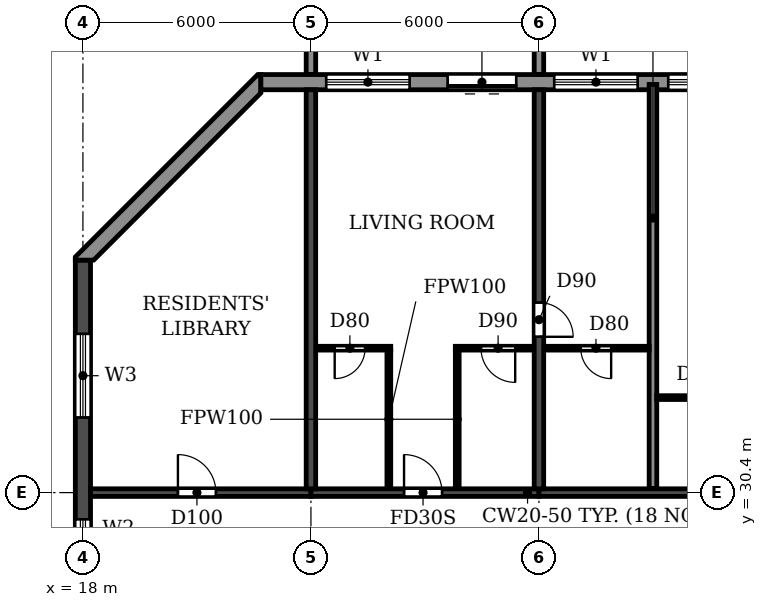
"""IFC4 building model, lengths in metres.
Left out: names, types, materials, properties, quantities, classifications, styles, units other than length and angle.
Written with IfcOpenShell. Run it as: python <this file> out.ifc"""

import sys

from ifc_helpers import new_model, si_unit, direction, frame, frame_2d, origin, place, context, subcontext, project, spatial, polyline, rectangle, outline, extrude, source, transform, mapped, element, fill, save


model = new_model("IFC4")
c1 = context("Model", 3, precision=1e-05, world=origin(), true_north=direction((0.0, 1.0)))
c2 = subcontext(c1, "Body", "Model", "MODEL_VIEW")
j1 = project(units=[si_unit("LENGTHUNIT", "METRE"), si_unit("PLANEANGLEUNIT", "RADIAN")], contexts=[c1])
p1 = place(None, origin())
s1 = spatial("IfcSite", under=j1, at=p1, CompositionType="ELEMENT")
p2 = place(p1, origin())
s2 = spatial("IfcBuilding", under=s1, at=p2, CompositionType="ELEMENT")
p3 = place(p2, frame((0.0, 0.0, 175.2)))
s3 = spatial("IfcBuildingStorey", under=s2, at=p3, CompositionType="ELEMENT", Elevation=175.2)
p4 = place(p3, frame((24.0, 30.5, 0.0), z_axis=(0.0, 0.0, 1.0), x_axis=(0.0, 1.0, 0.0)))
e1 = element("IfcWall", 1, at=p4, inside=s3, PredefinedType="SHEAR", context=c2, shape_type="SweptSolid", body=[
    extrude(rectangle(XDim=10.5, YDim=0.25, at=frame_2d((5.25, 0.0))), origin(), (0.0, 0.0, 1.0), 3.08),
])
p5 = place(p3, frame((30.0, 30.5, 0.0), z_axis=(0.0, 0.0, 1.0), x_axis=(0.0, 1.0, 0.0)))
e2 = element("IfcWall", 2, at=p5, inside=s3, PredefinedType="SHEAR", context=c2, shape_type="SweptSolid", body=[
    extrude(rectangle(XDim=10.5, YDim=0.25, at=frame_2d((5.25, 0.0))), origin(), (0.0, 0.0, 1.0), 3.08),
])
p6 = place(p5, frame((4.0, 0.0, 0.0)))
e3 = element("IfcOpeningElement", 3, at=p6, cuts=e2, PredefinedType="OPENING", context=c2, shape_type="SweptSolid", body=[
    extrude(rectangle(XDim=0.9, YDim=2.1, at=frame_2d((0.45, 1.05))), frame((0.0, 0.135, 0.0), z_axis=(0.0, -1.0, 0.0), x_axis=(1.0, 0.0, 0.0)), (0.0, 0.0, 1.0), 0.27),
])
p7 = place(p3, frame((18.0, 4.683, 0.0), z_axis=(0.0, 0.0, 1.0), x_axis=(0.0, 1.0, 0.0)))
e4 = element("IfcWall", 4, at=p7, inside=s3, PredefinedType="SHEAR", context=c2, shape_type="SweptSolid", body=[
    extrude(rectangle(XDim=31.834, YDim=0.4, at=frame_2d((15.917, 0.0))), origin(), (0.0, 0.0, 1.0), 3.08),
])
p8 = place(p7, frame((23.817, 0.0, 0.9)))
e5 = element("IfcOpeningElement", 5, at=p8, cuts=e4, PredefinedType="OPENING", context=c2, shape_type="SweptSolid", body=[
    extrude(rectangle(XDim=1.2, YDim=1.5, at=frame_2d((0.6, 0.75))), frame((0.0, 0.21, 0.0), z_axis=(0.0, -1.0, 0.0), x_axis=(1.0, 0.0, 0.0)), (0.0, 0.0, 1.0), 0.42),
])
p9 = place(p7, frame((8.017, 0.0, 0.9)))
e6 = element("IfcOpeningElement", 6, at=p9, cuts=e4, PredefinedType="OPENING", context=c2, shape_type="SweptSolid", body=[
    extrude(rectangle(XDim=1.2, YDim=1.5, at=frame_2d((0.6, 0.75))), frame((0.0, 0.21, 0.0), z_axis=(0.0, -1.0, 0.0), x_axis=(1.0, 0.0, 0.0)), (0.0, 0.0, 1.0), 0.42),
])
p10 = place(p7, frame((27.694, 0.0, 0.6)))
e7 = element("IfcOpeningElement", 7, at=p10, cuts=e4, PredefinedType="OPENING", context=c2, shape_type="SweptSolid", body=[
    extrude(rectangle(XDim=2.2, YDim=1.8, at=frame_2d((1.1, 0.9))), frame((0.0, 0.21, 0.0), z_axis=(0.0, -1.0, 0.0), x_axis=(1.0, 0.0, 0.0)), (0.0, 0.0, 1.0), 0.42),
])
p11 = place(p7, frame((2.541, 0.0, 0.6)))
e8 = element("IfcOpeningElement", 8, at=p11, cuts=e4, PredefinedType="OPENING", context=c2, shape_type="SweptSolid", body=[
    extrude(rectangle(XDim=2.2, YDim=1.8, at=frame_2d((1.1, 0.9))), frame((0.0, 0.21, 0.0), z_axis=(0.0, -1.0, 0.0), x_axis=(1.0, 0.0, 0.0)), (0.0, 0.0, 1.0), 0.42),
])
p12 = place(p7, frame((15.917, 0.0, 0.9)))
e9 = element("IfcOpeningElement", 9, at=p12, cuts=e4, PredefinedType="OPENING", context=c2, shape_type="SweptSolid", body=[
    extrude(rectangle(XDim=1.2, YDim=1.5, at=frame_2d((0.6, 0.75))), frame((0.0, 0.21, 0.0), z_axis=(0.0, -1.0, 0.0), x_axis=(1.0, 0.0, 0.0)), (0.0, 0.0, 1.0), 0.42),
])
p13 = place(p3, frame((18.2, 30.4, 0.0), z_axis=(0.0, 0.0, 1.0), x_axis=(1.0, 0.0, 0.0)))
e10 = element("IfcWall", 10, at=p13, inside=s3, PredefinedType="SHEAR", context=c2, shape_type="SweptSolid", body=[
    extrude(rectangle(XDim=5.8, YDim=0.2, at=frame_2d((2.9, 0.0))), origin(), (0.0, 0.0, 1.0), 2.48),
])
p14 = place(p13, frame((2.3, 0.0, 0.0)))
e11 = element("IfcOpeningElement", 11, at=p14, cuts=e10, PredefinedType="OPENING", context=c2, shape_type="SweptSolid", body=[
    extrude(rectangle(XDim=1.0, YDim=2.1, at=frame_2d((0.5, 1.05))), frame((0.0, 0.11, 0.0), z_axis=(0.0, -1.0, 0.0), x_axis=(1.0, 0.0, 0.0)), (0.0, 0.0, 1.0), 0.22),
])
p15 = place(p3, frame((24.0, 30.4, 0.0), z_axis=(0.0, 0.0, 1.0), x_axis=(1.0, 0.0, 0.0)))
e12 = element("IfcWall", 12, at=p15, inside=s3, PredefinedType="SHEAR", context=c2, shape_type="SweptSolid", body=[
    extrude(rectangle(XDim=6.0, YDim=0.2, at=frame_2d((3.0, 0.0))), origin(), (0.0, 0.0, 1.0), 2.48),
])
p16 = place(p15, frame((2.45, 0.0, 0.0)))
e13 = element("IfcOpeningElement", 13, at=p16, cuts=e12, PredefinedType="OPENING", context=c2, shape_type="SweptSolid", body=[
    extrude(rectangle(XDim=1.0, YDim=2.1, at=frame_2d((0.5, 1.05))), frame((0.0, 0.11, 0.0), z_axis=(0.0, -1.0, 0.0), x_axis=(1.0, 0.0, 0.0)), (0.0, 0.0, 1.0), 0.22),
])
p17 = place(p3, frame((30.0, 30.4, 0.0), z_axis=(0.0, 0.0, 1.0), x_axis=(1.0, 0.0, 0.0)))
e14 = element("IfcWall", 14, at=p17, inside=s3, PredefinedType="SHEAR", context=c2, shape_type="SweptSolid", body=[
    extrude(rectangle(XDim=6.0, YDim=0.2, at=frame_2d((3.0, 0.0))), origin(), (0.0, 0.0, 1.0), 2.48),
])
p18 = place(p3, frame((79.317, 41.2, 0.0), z_axis=(0.0, 0.0, 1.0), x_axis=(-1.0, 0.0, 0.0)))
e15 = element("IfcWall", 15, at=p18, inside=s3, PredefinedType="STANDARD", context=c2, shape_type="SweptSolid", body=[
    extrude(rectangle(XDim=56.634, YDim=0.4, at=frame_2d((28.317, 0.0))), origin(), (0.0, 0.0, 1.0), 3.08),
])
p19 = place(p18, frame((52.717, 0.0, 0.9)))
e16 = element("IfcOpeningElement", 16, at=p19, cuts=e15, PredefinedType="OPENING", context=c2, shape_type="SweptSolid", body=[
    extrude(rectangle(XDim=2.2, YDim=1.5, at=frame_2d((1.1, 0.75))), frame((0.0, 0.21, 0.0), z_axis=(0.0, -1.0, 0.0), x_axis=(1.0, 0.0, 0.0)), (0.0, 0.0, 1.0), 0.42),
])
p20 = place(p18, frame((49.917, 0.0, 0.0)))
e17 = element("IfcOpeningElement", 17, at=p20, cuts=e15, PredefinedType="OPENING", context=c2, shape_type="SweptSolid", body=[
    extrude(rectangle(XDim=1.8, YDim=2.4, at=frame_2d((0.9, 1.2))), frame((0.0, 0.21, 0.0), z_axis=(0.0, -1.0, 0.0), x_axis=(1.0, 0.0, 0.0)), (0.0, 0.0, 1.0), 0.42),
])
p21 = place(p18, frame((46.717, 0.0, 0.9)))
e18 = element("IfcOpeningElement", 18, at=p21, cuts=e15, PredefinedType="OPENING", context=c2, shape_type="SweptSolid", body=[
    extrude(rectangle(XDim=2.2, YDim=1.5, at=frame_2d((1.1, 0.75))), frame((0.0, 0.21, 0.0), z_axis=(0.0, -1.0, 0.0), x_axis=(1.0, 0.0, 0.0)), (0.0, 0.0, 1.0), 0.42),
])
p22 = place(p18, frame((43.717, 0.0, 0.9)))
e19 = element("IfcOpeningElement", 19, at=p22, cuts=e15, PredefinedType="OPENING", context=c2, shape_type="SweptSolid", body=[
    extrude(rectangle(XDim=2.2, YDim=1.5, at=frame_2d((1.1, 0.75))), frame((0.0, 0.21, 0.0), z_axis=(0.0, -1.0, 0.0), x_axis=(1.0, 0.0, 0.0)), (0.0, 0.0, 1.0), 0.42),
])
p23 = place(p18, frame((40.917, 0.0, 0.0)))
e20 = element("IfcOpeningElement", 20, at=p23, cuts=e15, PredefinedType="OPENING", context=c2, shape_type="SweptSolid", body=[
    extrude(rectangle(XDim=1.8, YDim=2.4, at=frame_2d((0.9, 1.2))), frame((0.0, 0.21, 0.0), z_axis=(0.0, -1.0, 0.0), x_axis=(1.0, 0.0, 0.0)), (0.0, 0.0, 1.0), 0.42),
])
p24 = place(p18, frame((37.717, 0.0, 0.9)))
e21 = element("IfcOpeningElement", 21, at=p24, cuts=e15, PredefinedType="OPENING", context=c2, shape_type="SweptSolid", body=[
    extrude(rectangle(XDim=2.2, YDim=1.5, at=frame_2d((1.1, 0.75))), frame((0.0, 0.21, 0.0), z_axis=(0.0, -1.0, 0.0), x_axis=(1.0, 0.0, 0.0)), (0.0, 0.0, 1.0), 0.42),
])
p25 = place(p18, frame((34.717, 0.0, 0.9)))
e22 = element("IfcOpeningElement", 22, at=p25, cuts=e15, PredefinedType="OPENING", context=c2, shape_type="SweptSolid", body=[
    extrude(rectangle(XDim=2.2, YDim=1.5, at=frame_2d((1.1, 0.75))), frame((0.0, 0.21, 0.0), z_axis=(0.0, -1.0, 0.0), x_axis=(1.0, 0.0, 0.0)), (0.0, 0.0, 1.0), 0.42),
])
p26 = place(p18, frame((31.717, 0.0, 0.9)))
e23 = element("IfcOpeningElement", 23, at=p26, cuts=e15, PredefinedType="OPENING", context=c2, shape_type="SweptSolid", body=[
    extrude(rectangle(XDim=2.2, YDim=1.5, at=frame_2d((1.1, 0.75))), frame((0.0, 0.21, 0.0), z_axis=(0.0, -1.0, 0.0), x_axis=(1.0, 0.0, 0.0)), (0.0, 0.0, 1.0), 0.42),
])
p27 = place(p18, frame((28.717, 0.0, 0.9)))
e24 = element("IfcOpeningElement", 24, at=p27, cuts=e15, PredefinedType="OPENING", context=c2, shape_type="SweptSolid", body=[
    extrude(rectangle(XDim=2.2, YDim=1.5, at=frame_2d((1.1, 0.75))), frame((0.0, 0.21, 0.0), z_axis=(0.0, -1.0, 0.0), x_axis=(1.0, 0.0, 0.0)), (0.0, 0.0, 1.0), 0.42),
])
p28 = place(p18, frame((25.917, 0.0, 0.0)))
e25 = element("IfcOpeningElement", 25, at=p28, cuts=e15, PredefinedType="OPENING", context=c2, shape_type="SweptSolid", body=[
    extrude(rectangle(XDim=1.8, YDim=2.4, at=frame_2d((0.9, 1.2))), frame((0.0, 0.21, 0.0), z_axis=(0.0, -1.0, 0.0), x_axis=(1.0, 0.0, 0.0)), (0.0, 0.0, 1.0), 0.42),
])
p29 = place(p18, frame((22.717, 0.0, 0.9)))
e26 = element("IfcOpeningElement", 26, at=p29, cuts=e15, PredefinedType="OPENING", context=c2, shape_type="SweptSolid", body=[
    extrude(rectangle(XDim=2.2, YDim=1.5, at=frame_2d((1.1, 0.75))), frame((0.0, 0.21, 0.0), z_axis=(0.0, -1.0, 0.0), x_axis=(1.0, 0.0, 0.0)), (0.0, 0.0, 1.0), 0.42),
])
p30 = place(p18, frame((19.917, 0.0, 0.0)))
e27 = element("IfcOpeningElement", 27, at=p30, cuts=e15, PredefinedType="OPENING", context=c2, shape_type="SweptSolid", body=[
    extrude(rectangle(XDim=1.8, YDim=2.4, at=frame_2d((0.9, 1.2))), frame((0.0, 0.21, 0.0), z_axis=(0.0, -1.0, 0.0), x_axis=(1.0, 0.0, 0.0)), (0.0, 0.0, 1.0), 0.42),
])
p31 = place(p18, frame((16.717, 0.0, 0.9)))
e28 = element("IfcOpeningElement", 28, at=p31, cuts=e15, PredefinedType="OPENING", context=c2, shape_type="SweptSolid", body=[
    extrude(rectangle(XDim=2.2, YDim=1.5, at=frame_2d((1.1, 0.75))), frame((0.0, 0.21, 0.0), z_axis=(0.0, -1.0, 0.0), x_axis=(1.0, 0.0, 0.0)), (0.0, 0.0, 1.0), 0.42),
])
p32 = place(p18, frame((13.717, 0.0, 0.9)))
e29 = element("IfcOpeningElement", 29, at=p32, cuts=e15, PredefinedType="OPENING", context=c2, shape_type="SweptSolid", body=[
    extrude(rectangle(XDim=2.2, YDim=1.5, at=frame_2d((1.1, 0.75))), frame((0.0, 0.21, 0.0), z_axis=(0.0, -1.0, 0.0), x_axis=(1.0, 0.0, 0.0)), (0.0, 0.0, 1.0), 0.42),
])
p33 = place(p18, frame((10.917, 0.0, 0.0)))
e30 = element("IfcOpeningElement", 30, at=p33, cuts=e15, PredefinedType="OPENING", context=c2, shape_type="SweptSolid", body=[
    extrude(rectangle(XDim=1.8, YDim=2.4, at=frame_2d((0.9, 1.2))), frame((0.0, 0.21, 0.0), z_axis=(0.0, -1.0, 0.0), x_axis=(1.0, 0.0, 0.0)), (0.0, 0.0, 1.0), 0.42),
])
p34 = place(p18, frame((7.717, 0.0, 0.9)))
e31 = element("IfcOpeningElement", 31, at=p34, cuts=e15, PredefinedType="OPENING", context=c2, shape_type="SweptSolid", body=[
    extrude(rectangle(XDim=2.2, YDim=1.5, at=frame_2d((1.1, 0.75))), frame((0.0, 0.21, 0.0), z_axis=(0.0, -1.0, 0.0), x_axis=(1.0, 0.0, 0.0)), (0.0, 0.0, 1.0), 0.42),
])
p35 = place(p18, frame((4.717, 0.0, 0.9)))
e32 = element("IfcOpeningElement", 32, at=p35, cuts=e15, PredefinedType="OPENING", context=c2, shape_type="SweptSolid", body=[
    extrude(rectangle(XDim=2.2, YDim=1.5, at=frame_2d((1.1, 0.75))), frame((0.0, 0.21, 0.0), z_axis=(0.0, -1.0, 0.0), x_axis=(1.0, 0.0, 0.0)), (0.0, 0.0, 1.0), 0.42),
])
p36 = place(p18, frame((1.917, 0.0, 0.0)))
e33 = element("IfcOpeningElement", 33, at=p36, cuts=e15, PredefinedType="OPENING", context=c2, shape_type="SweptSolid", body=[
    extrude(rectangle(XDim=1.8, YDim=2.4, at=frame_2d((0.9, 1.2))), frame((0.0, 0.21, 0.0), z_axis=(0.0, -1.0, 0.0), x_axis=(1.0, 0.0, 0.0)), (0.0, 0.0, 1.0), 0.42),
])
p37 = place(p3, origin())
e34 = element("IfcWall", 34, at=p37, inside=s3, PredefinedType="STANDARD", context=c2, shape_type="SweptSolid", body=[
    extrude(outline(polyline([(22.683, 41.4), (22.6, 41.4), (17.8, 36.6), (17.8, 36.517), (18.283, 36.517), (22.683, 40.917), (22.683, 41.4)])), origin(), (0.0, 0.0, 1.0), 3.08),
])
m1 = source(origin(), c2, "Body", "SweptSolid", [
    extrude(outline(polyline([(0.0, 0.0), (0.25, 0.0), (0.25, 3.1), (0.0, 3.1), (0.0, 0.0)])), origin(), (0.0, 0.0, 1.0), 3.1),
])
for number, where in (
    (35, (23.875, 41.4, 0.0)),
    (36, (29.875, 41.4, 0.0)),
):
    element("IfcWall", number, at=place(p3, frame(where)), inside=s3, PredefinedType="STANDARD", context=c2, shape_type="MappedRepresentation", body=[
        mapped(m1, transform((0.0, 0.0, 0.0))),
    ])
p38 = place(p3, frame((33.0, 30.51, 0.0), z_axis=(0.0, 0.0, 1.0), x_axis=(0.0, 1.0, 0.0)))
e37 = element("IfcWall", 37, at=p38, inside=s3, PredefinedType="PARTITIONING", context=c2, shape_type="SweptSolid", body=[
    extrude(rectangle(XDim=10.63, YDim=0.2, at=frame_2d((5.315, 0.0))), origin(), (0.0, 0.0, 1.0), 3.08),
])
p39 = place(p3, frame((33.1, 32.9, 0.0), z_axis=(0.0, 0.0, 1.0), x_axis=(1.0, 0.0, 0.0)))
e38 = element("IfcWall", 38, at=p39, inside=s3, PredefinedType="PARTITIONING", context=c2, shape_type="SweptSolid", body=[
    extrude(rectangle(XDim=2.765, YDim=0.1, at=frame_2d((1.382, 0.0))), origin(), (0.0, 0.0, 1.0), 3.08),
])
p40 = place(p39, frame((1.0, 0.0, 0.0)))
e39 = element("IfcOpeningElement", 39, at=p40, cuts=e38, PredefinedType="OPENING", context=c2, shape_type="SweptSolid", body=[
    extrude(rectangle(XDim=0.8, YDim=2.1, at=frame_2d((0.4, 1.05))), frame((0.0, 0.06, 0.0), z_axis=(0.0, -1.0, 0.0), x_axis=(1.0, 0.0, 0.0)), (0.0, 0.0, 1.0), 0.12),
])
p41 = place(p3, frame((24.135, 34.2, 0.0), z_axis=(0.0, 0.0, 1.0), x_axis=(1.0, 0.0, 0.0)))
e40 = element("IfcWall", 40, at=p41, inside=s3, PredefinedType="PARTITIONING", context=c2, shape_type="SweptSolid", body=[
    extrude(rectangle(XDim=1.965, YDim=0.1, at=frame_2d((0.982, 0.0))), origin(), (0.0, 0.0, 1.0), 3.08),
])
p42 = place(p41, frame((0.49, 0.0, 0.0)))
e41 = element("IfcOpeningElement", 41, at=p42, cuts=e40, PredefinedType="OPENING", context=c2, shape_type="SweptSolid", body=[
    extrude(rectangle(XDim=0.8, YDim=2.1, at=frame_2d((0.4, 1.05))), frame((0.0, 0.06, 0.0), z_axis=(0.0, -1.0, 0.0), x_axis=(1.0, 0.0, 0.0)), (0.0, 0.0, 1.0), 0.12),
])
p43 = place(p3, frame((27.8, 34.2, 0.0), z_axis=(0.0, 0.0, 1.0), x_axis=(1.0, 0.0, 0.0)))
e42 = element("IfcWall", 42, at=p43, inside=s3, PredefinedType="PARTITIONING", context=c2, shape_type="SweptSolid", body=[
    extrude(rectangle(XDim=2.065, YDim=0.1, at=frame_2d((1.032, 0.0))), origin(), (0.0, 0.0, 1.0), 3.08),
])
p44 = place(p43, frame((0.675, 0.0, 0.0)))
e43 = element("IfcOpeningElement", 43, at=p44, cuts=e42, PredefinedType="OPENING", context=c2, shape_type="SweptSolid", body=[
    extrude(rectangle(XDim=0.9, YDim=2.1, at=frame_2d((0.45, 1.05))), frame((0.0, 0.06, 0.0), z_axis=(0.0, -1.0, 0.0), x_axis=(1.0, 0.0, 0.0)), (0.0, 0.0, 1.0), 0.12),
])
p45 = place(p3, frame((30.135, 34.2, 0.0), z_axis=(0.0, 0.0, 1.0), x_axis=(1.0, 0.0, 0.0)))
e44 = element("IfcWall", 44, at=p45, inside=s3, PredefinedType="PARTITIONING", context=c2, shape_type="SweptSolid", body=[
    extrude(rectangle(XDim=2.765, YDim=0.1, at=frame_2d((1.382, 0.0))), origin(), (0.0, 0.0, 1.0), 3.08),
])
p46 = place(p45, frame((0.965, 0.0, 0.0)))
e45 = element("IfcOpeningElement", 45, at=p46, cuts=e44, PredefinedType="OPENING", context=c2, shape_type="SweptSolid", body=[
    extrude(rectangle(XDim=0.8, YDim=2.1, at=frame_2d((0.4, 1.05))), frame((0.0, 0.06, 0.0), z_axis=(0.0, -1.0, 0.0), x_axis=(1.0, 0.0, 0.0)), (0.0, 0.0, 1.0), 0.12),
])
for number, where, z_axis, x_axis in (
    (46, (26.05, 30.51, 0.0), (0.0, 0.0, 1.0), (0.0, 1.0, 0.0)),
    (47, (27.85, 30.51, 0.0), (0.0, 0.0, 1.0), (0.0, 1.0, 0.0)),
):
    element("IfcWall", number, at=place(p3, frame(where, z_axis=z_axis, x_axis=x_axis)), inside=s3, PredefinedType="PARTITIONING", context=c2, shape_type="SweptSolid", body=[
        extrude(rectangle(XDim=3.64, YDim=0.1, at=frame_2d((1.82, 0.0))), origin(), (0.0, 0.0, 1.0), 3.08),
    ])
p47 = place(p19, origin())
e48 = element("IfcWindow", 48, at=p47, inside=s3, PartitioningType="DOUBLE_PANEL_HORIZONTAL", PredefinedType="WINDOW", context=c2, shape_type="SweptSolid", body=[
    extrude(rectangle(XDim=2.2, YDim=1.5, at=frame_2d((1.1, 0.75))), frame((0.0, 0.03, 0.0), z_axis=(0.0, -1.0, 0.0), x_axis=(1.0, 0.0, 0.0)), (0.0, 0.0, 1.0), 0.06),
])
fill(e16, e48)
p48 = place(p20, origin())
e49 = element("IfcDoor", 49, at=p48, inside=s3, OperationType="DOUBLE_DOOR_SLIDING", PredefinedType="DOOR", context=c2, shape_type="SweptSolid", body=[
    extrude(rectangle(XDim=1.8, YDim=2.4, at=frame_2d((0.9, 1.2))), frame((0.0, 0.025, 0.0), z_axis=(0.0, -1.0, 0.0), x_axis=(1.0, 0.0, 0.0)), (0.0, 0.0, 1.0), 0.05),
])
fill(e17, e49)
p49 = place(p21, origin())
e50 = element("IfcWindow", 50, at=p49, inside=s3, PartitioningType="DOUBLE_PANEL_HORIZONTAL", PredefinedType="WINDOW", context=c2, shape_type="SweptSolid", body=[
    extrude(rectangle(XDim=2.2, YDim=1.5, at=frame_2d((1.1, 0.75))), frame((0.0, 0.03, 0.0), z_axis=(0.0, -1.0, 0.0), x_axis=(1.0, 0.0, 0.0)), (0.0, 0.0, 1.0), 0.06),
])
fill(e18, e50)
p50 = place(p22, origin())
e51 = element("IfcWindow", 51, at=p50, inside=s3, PartitioningType="DOUBLE_PANEL_HORIZONTAL", PredefinedType="WINDOW", context=c2, shape_type="SweptSolid", body=[
    extrude(rectangle(XDim=2.2, YDim=1.5, at=frame_2d((1.1, 0.75))), frame((0.0, 0.03, 0.0), z_axis=(0.0, -1.0, 0.0), x_axis=(1.0, 0.0, 0.0)), (0.0, 0.0, 1.0), 0.06),
])
fill(e19, e51)
p51 = place(p8, origin())
e52 = element("IfcWindow", 52, at=p51, inside=s3, PartitioningType="SINGLE_PANEL", PredefinedType="WINDOW", context=c2, shape_type="SweptSolid", body=[
    extrude(rectangle(XDim=1.2, YDim=1.5, at=frame_2d((0.6, 0.75))), frame((0.0, 0.03, 0.0), z_axis=(0.0, -1.0, 0.0), x_axis=(1.0, 0.0, 0.0)), (0.0, 0.0, 1.0), 0.06),
])
fill(e5, e52)
p52 = place(p10, origin())
e53 = element("IfcWindow", 53, at=p52, inside=s3, PartitioningType="DOUBLE_PANEL_HORIZONTAL", PredefinedType="WINDOW", context=c2, shape_type="SweptSolid", body=[
    extrude(rectangle(XDim=2.2, YDim=1.8, at=frame_2d((1.1, 0.9))), frame((0.0, 0.03, 0.0), z_axis=(0.0, -1.0, 0.0), x_axis=(1.0, 0.0, 0.0)), (0.0, 0.0, 1.0), 0.06),
])
fill(e7, e53)
p53 = place(p14, origin())
e54 = element("IfcDoor", 54, at=p53, inside=s3, OperationType="SINGLE_SWING_LEFT", PredefinedType="DOOR", context=c2, shape_type="SweptSolid", body=[
    extrude(rectangle(XDim=1.0, YDim=2.1, at=frame_2d((0.5, 1.05))), frame((0.0, 0.025, 0.0), z_axis=(0.0, -1.0, 0.0), x_axis=(1.0, 0.0, 0.0)), (0.0, 0.0, 1.0), 0.05),
])
fill(e11, e54)
p54 = place(p46, frame((0.8, 0.0, 0.0), z_axis=(0.0, 0.0, 1.0), x_axis=(-1.0, 0.0, 0.0)))
e55 = element("IfcDoor", 55, at=p54, inside=s3, OperationType="SINGLE_SWING_LEFT", PredefinedType="DOOR", context=c2, shape_type="SweptSolid", body=[
    extrude(rectangle(XDim=0.8, YDim=2.1, at=frame_2d((0.4, 1.05))), frame((0.0, 0.025, 0.0), z_axis=(0.0, -1.0, 0.0), x_axis=(1.0, 0.0, 0.0)), (0.0, 0.0, 1.0), 0.05),
])
fill(e45, e55)
p55 = place(p42, frame((0.8, 0.0, 0.0), z_axis=(0.0, 0.0, 1.0), x_axis=(-1.0, 0.0, 0.0)))
e56 = element("IfcDoor", 56, at=p55, inside=s3, OperationType="SINGLE_SWING_RIGHT", PredefinedType="DOOR", context=c2, shape_type="SweptSolid", body=[
    extrude(rectangle(XDim=0.8, YDim=2.1, at=frame_2d((0.4, 1.05))), frame((0.0, 0.025, 0.0), z_axis=(0.0, -1.0, 0.0), x_axis=(1.0, 0.0, 0.0)), (0.0, 0.0, 1.0), 0.05),
])
fill(e41, e56)
p56 = place(p16, origin())
e57 = element("IfcDoor", 57, at=p56, inside=s3, OperationType="SINGLE_SWING_LEFT", PredefinedType="DOOR", context=c2, shape_type="SweptSolid", body=[
    extrude(rectangle(XDim=1.0, YDim=2.1, at=frame_2d((0.5, 1.05))), frame((0.0, 0.025, 0.0), z_axis=(0.0, -1.0, 0.0), x_axis=(1.0, 0.0, 0.0)), (0.0, 0.0, 1.0), 0.05),
])
fill(e13, e57)
p57 = place(p44, frame((0.9, 0.0, 0.0), z_axis=(0.0, 0.0, 1.0), x_axis=(-1.0, 0.0, 0.0)))
e58 = element("IfcDoor", 58, at=p57, inside=s3, OperationType="SINGLE_SWING_LEFT", PredefinedType="DOOR", context=c2, shape_type="SweptSolid", body=[
    extrude(rectangle(XDim=0.9, YDim=2.1, at=frame_2d((0.45, 1.05))), frame((0.0, 0.025, 0.0), z_axis=(0.0, -1.0, 0.0), x_axis=(1.0, 0.0, 0.0)), (0.0, 0.0, 1.0), 0.05),
])
fill(e43, e58)
p58 = place(p6, frame((0.9, 0.0, 0.0), z_axis=(0.0, 0.0, 1.0), x_axis=(-1.0, 0.0, 0.0)))
e59 = element("IfcDoor", 59, at=p58, inside=s3, OperationType="SINGLE_SWING_RIGHT", PredefinedType="DOOR", context=c2, shape_type="SweptSolid", body=[
    extrude(rectangle(XDim=0.9, YDim=2.1, at=frame_2d((0.45, 1.05))), frame((0.0, 0.025, 0.0), z_axis=(0.0, -1.0, 0.0), x_axis=(1.0, 0.0, 0.0)), (0.0, 0.0, 1.0), 0.05),
])
fill(e3, e59)
save(model, sys.argv[1])
